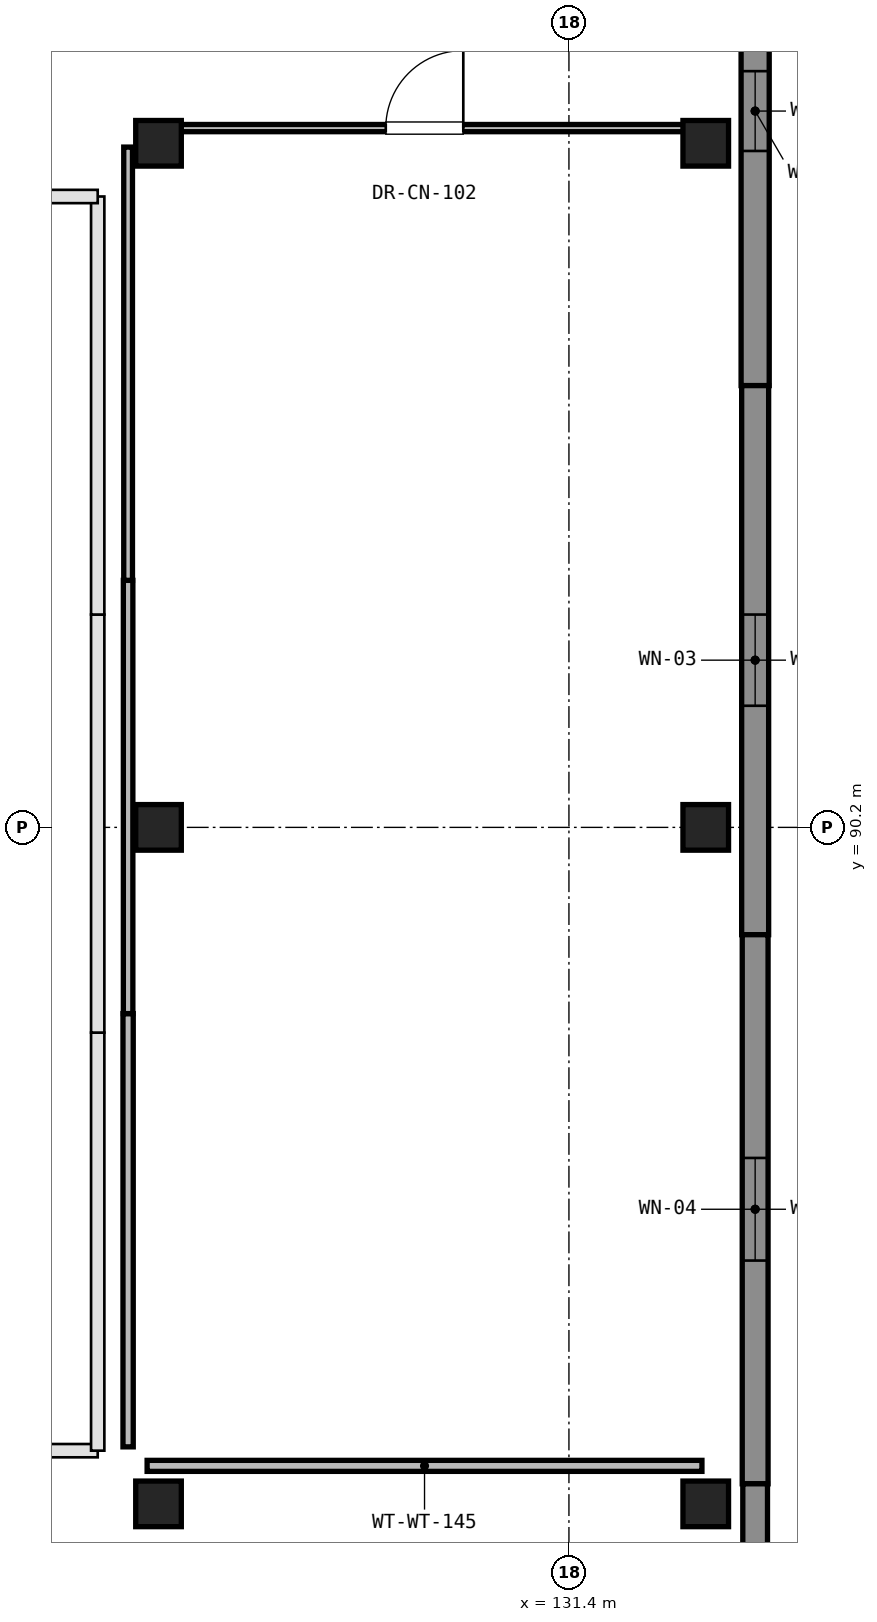
"""IFC4 building model, lengths in metres.
Left out: names, types, materials, properties, quantities, classifications, styles, units other than length and angle.
Written with IfcOpenShell. Run it as: python <this file> out.ifc"""

import sys

from ifc_helpers import new_model, si_unit, direction, frame, frame_2d, origin, origin_2d, place, context, subcontext, project, spatial, rectangle, extrude, element, fill, save


model = new_model("IFC4")
c1 = context("Model", 3, precision=1e-05, world=origin(), true_north=direction((0.0, 1.0)))
c2 = subcontext(c1, "Body", "Model", "MODEL_VIEW")
j1 = project(units=[si_unit("LENGTHUNIT", "METRE"), si_unit("PLANEANGLEUNIT", "RADIAN")], contexts=[c1])
p1 = place(None, origin())
s1 = spatial("IfcSite", under=j1, at=p1, CompositionType="ELEMENT")
p2 = place(p1, origin())
s2 = spatial("IfcBuilding", under=s1, at=p2, CompositionType="ELEMENT")
p3 = place(p2, frame((0.0, 0.0, 9.52)))
s3 = spatial("IfcBuildingStorey", under=s2, at=p3, CompositionType="ELEMENT", Elevation=9.52)
for number, where, z_axis, x_axis in (
    (1, (126.0, 81.3, 0.0), (0.0, 0.0, 1.0), (1.0, 0.0, 0.0)),
    (2, (126.0, 90.2, 0.0), (0.0, 0.0, 1.0), (1.0, 0.0, 0.0)),
    (3, (126.0, 99.2, 0.0), (0.0, 0.0, 1.0), (1.0, 0.0, 0.0)),
    (4, (133.2, 81.3, 0.0), (0.0, 0.0, 1.0), (1.0, 0.0, 0.0)),
    (5, (133.2, 90.2, 0.0), (0.0, 0.0, 1.0), (1.0, 0.0, 0.0)),
    (6, (133.2, 99.2, 0.0), (0.0, 0.0, 1.0), (1.0, 0.0, 0.0)),
):
    element("IfcColumn", number, at=place(p3, frame(where, z_axis=z_axis, x_axis=x_axis)), inside=s3, PredefinedType="COLUMN", context=c2, shape_type="SweptSolid", body=[
        extrude(rectangle(XDim=0.6, YDim=0.6, at=origin_2d()), origin(), (0.0, 0.0, 1.0), 4.08),
    ])
p4 = place(p3, frame((133.85, 103.236, 0.0), z_axis=(0.0, 0.0, 1.0), x_axis=(0.0, -1.0, 0.0)))
e7 = element("IfcWall", 7, at=p4, inside=s3, PredefinedType="SOLIDWALL", context=c2, shape_type="SweptSolid", body=[
    extrude(rectangle(XDim=7.224, YDim=0.37, at=frame_2d((3.612, 0.0))), origin(), (0.0, 0.0, 1.0), 3.82),
])
p5 = place(p4, frame((3.087, 0.0, 0.9)))
e8 = element("IfcOpeningElement", 8, at=p5, cuts=e7, PredefinedType="OPENING", context=c2, shape_type="SweptSolid", body=[
    extrude(rectangle(XDim=1.05, YDim=1.5, at=frame_2d((0.525, 0.75))), frame((0.0, 0.195, 0.0), z_axis=(0.0, -1.0, 0.0), x_axis=(1.0, 0.0, 0.0)), (0.0, 0.0, 1.0), 0.39),
])
p6 = place(p3, frame((133.85, 96.012, 0.0), z_axis=(0.0, 0.0, 1.0), x_axis=(0.0, -1.0, 0.0)))
e9 = element("IfcWall", 9, at=p6, inside=s3, PredefinedType="SOLIDWALL", context=c2, shape_type="SweptSolid", body=[
    extrude(rectangle(XDim=7.224, YDim=0.355, at=frame_2d((3.612, 0.0))), origin(), (0.0, 0.0, 1.0), 3.82),
])
p7 = place(p6, frame((3.012, 0.0, 0.9)))
e10 = element("IfcOpeningElement", 10, at=p7, cuts=e9, PredefinedType="OPENING", context=c2, shape_type="SweptSolid", body=[
    extrude(rectangle(XDim=1.2, YDim=1.5, at=frame_2d((0.6, 0.75))), frame((0.0, 0.188, 0.0), z_axis=(0.0, -1.0, 0.0), x_axis=(1.0, 0.0, 0.0)), (0.0, 0.0, 1.0), 0.375),
])
p8 = place(p3, frame((133.85, 88.788, 0.0), z_axis=(0.0, 0.0, 1.0), x_axis=(0.0, -1.0, 0.0)))
e11 = element("IfcWall", 11, at=p8, inside=s3, PredefinedType="SOLIDWALL", context=c2, shape_type="SweptSolid", body=[
    extrude(rectangle(XDim=7.224, YDim=0.34, at=frame_2d((3.612, 0.0))), origin(), (0.0, 0.0, 1.0), 3.82),
])
p9 = place(p8, frame((2.937, 0.0, 0.9)))
e12 = element("IfcOpeningElement", 12, at=p9, cuts=e11, PredefinedType="OPENING", context=c2, shape_type="SweptSolid", body=[
    extrude(rectangle(XDim=1.35, YDim=1.5, at=frame_2d((0.675, 0.75))), frame((0.0, 0.18, 0.0), z_axis=(0.0, -1.0, 0.0), x_axis=(1.0, 0.0, 0.0)), (0.0, 0.0, 1.0), 0.36),
])
p10 = place(p3, frame((133.85, 81.564, 0.0), z_axis=(0.0, 0.0, 1.0), x_axis=(0.0, -1.0, 0.0)))
e13 = element("IfcWall", 13, at=p10, inside=s3, PredefinedType="SOLIDWALL", context=c2, shape_type="SweptSolid", body=[
    extrude(rectangle(XDim=7.224, YDim=0.325, at=frame_2d((3.612, 0.0))), origin(), (0.0, 0.0, 1.0), 3.82),
])
p11 = place(p10, frame((2.862, 0.0, 0.9)))
e14 = element("IfcOpeningElement", 14, at=p11, cuts=e13, PredefinedType="OPENING", context=c2, shape_type="SweptSolid", body=[
    extrude(rectangle(XDim=1.5, YDim=1.5, at=frame_2d((0.75, 0.75))), frame((0.0, 0.172, 0.0), z_axis=(0.0, -1.0, 0.0), x_axis=(1.0, 0.0, 0.0)), (0.0, 0.0, 1.0), 0.345),
])
p12 = place(p3, frame((125.85, 99.4, 0.0), z_axis=(0.0, 0.0, 1.0), x_axis=(1.0, 0.0, 0.0)))
e15 = element("IfcWall", 15, at=p12, inside=s3, PredefinedType="PARTITIONING", context=c2, shape_type="SweptSolid", body=[
    extrude(rectangle(XDim=7.3, YDim=0.095, at=frame_2d((3.65, 0.0))), origin(), (0.0, 0.0, 1.0), 3.02),
])
p13 = place(p12, frame((3.14, 0.0, 0.0)))
e16 = element("IfcOpeningElement", 16, at=p13, cuts=e15, PredefinedType="OPENING", context=c2, shape_type="SweptSolid", body=[
    extrude(rectangle(XDim=1.02, YDim=2.15, at=frame_2d((0.51, 1.075))), frame((0.0, 0.057, 0.0), z_axis=(0.0, -1.0, 0.0), x_axis=(1.0, 0.0, 0.0)), (0.0, 0.0, 1.0), 0.115),
])
p14 = place(p3, frame((133.15, 81.8, 0.0), z_axis=(0.0, 0.0, 1.0), x_axis=(-1.0, 0.0, 0.0)))
e17 = element("IfcWall", 17, at=p14, inside=s3, PredefinedType="PARTITIONING", context=c2, shape_type="SweptSolid", body=[
    extrude(rectangle(XDim=7.3, YDim=0.145, at=frame_2d((3.65, 0.0))), origin(), (0.0, 0.0, 1.0), 3.07),
])
p15 = place(p3, frame((125.6, 82.05, 0.0), z_axis=(0.0, 0.0, 1.0), x_axis=(0.0, 1.0, 0.0)))
e18 = element("IfcWall", 18, at=p15, inside=s3, PredefinedType="PARTITIONING", context=c2, shape_type="SweptSolid", body=[
    extrude(rectangle(XDim=5.7, YDim=0.135, at=frame_2d((2.85, 0.0))), origin(), (0.0, 0.0, 1.0), 3.82),
])
p16 = place(p3, frame((125.6, 87.75, 0.0), z_axis=(0.0, 0.0, 1.0), x_axis=(0.0, 1.0, 0.0)))
e19 = element("IfcWall", 19, at=p16, inside=s3, PredefinedType="PARTITIONING", context=c2, shape_type="SweptSolid", body=[
    extrude(rectangle(XDim=5.7, YDim=0.125, at=frame_2d((2.85, 0.0))), origin(), (0.0, 0.0, 1.0), 3.17),
])
p17 = place(p3, frame((125.6, 93.45, 0.0), z_axis=(0.0, 0.0, 1.0), x_axis=(0.0, 1.0, 0.0)))
e20 = element("IfcWall", 20, at=p17, inside=s3, PredefinedType="PARTITIONING", context=c2, shape_type="SweptSolid", body=[
    extrude(rectangle(XDim=5.7, YDim=0.115, at=frame_2d((2.85, 0.0))), origin(), (0.0, 0.0, 1.0), 3.07),
])
p18 = place(p5, origin())
e21 = element("IfcWindow", 21, at=p18, inside=s3, PartitioningType="SINGLE_PANEL", PredefinedType="WINDOW", context=c2, shape_type="SweptSolid", body=[
    extrude(rectangle(XDim=1.05, YDim=1.5, at=frame_2d((0.525, 0.75))), frame((0.0, 0.03, 0.0), z_axis=(0.0, -1.0, 0.0), x_axis=(1.0, 0.0, 0.0)), (0.0, 0.0, 1.0), 0.06),
])
fill(e8, e21)
p19 = place(p7, origin())
e22 = element("IfcWindow", 22, at=p19, inside=s3, PartitioningType="SINGLE_PANEL", PredefinedType="WINDOW", context=c2, shape_type="SweptSolid", body=[
    extrude(rectangle(XDim=1.2, YDim=1.5, at=frame_2d((0.6, 0.75))), frame((0.0, 0.03, 0.0), z_axis=(0.0, -1.0, 0.0), x_axis=(1.0, 0.0, 0.0)), (0.0, 0.0, 1.0), 0.06),
])
fill(e10, e22)
p20 = place(p9, origin())
e23 = element("IfcWindow", 23, at=p20, inside=s3, PartitioningType="SINGLE_PANEL", PredefinedType="WINDOW", context=c2, shape_type="SweptSolid", body=[
    extrude(rectangle(XDim=1.35, YDim=1.5, at=frame_2d((0.675, 0.75))), frame((0.0, 0.03, 0.0), z_axis=(0.0, -1.0, 0.0), x_axis=(1.0, 0.0, 0.0)), (0.0, 0.0, 1.0), 0.06),
])
fill(e12, e23)
p21 = place(p13, origin())
e24 = element("IfcDoor", 24, at=p21, inside=s3, OperationType="SINGLE_SWING_RIGHT", PredefinedType="DOOR", context=c2, shape_type="SweptSolid", body=[
    extrude(rectangle(XDim=1.02, YDim=2.15, at=frame_2d((0.51, 1.075))), frame((0.0, 0.025, 0.0), z_axis=(0.0, -1.0, 0.0), x_axis=(1.0, 0.0, 0.0)), (0.0, 0.0, 1.0), 0.05),
])
fill(e16, e24)
save(model, sys.argv[1])
